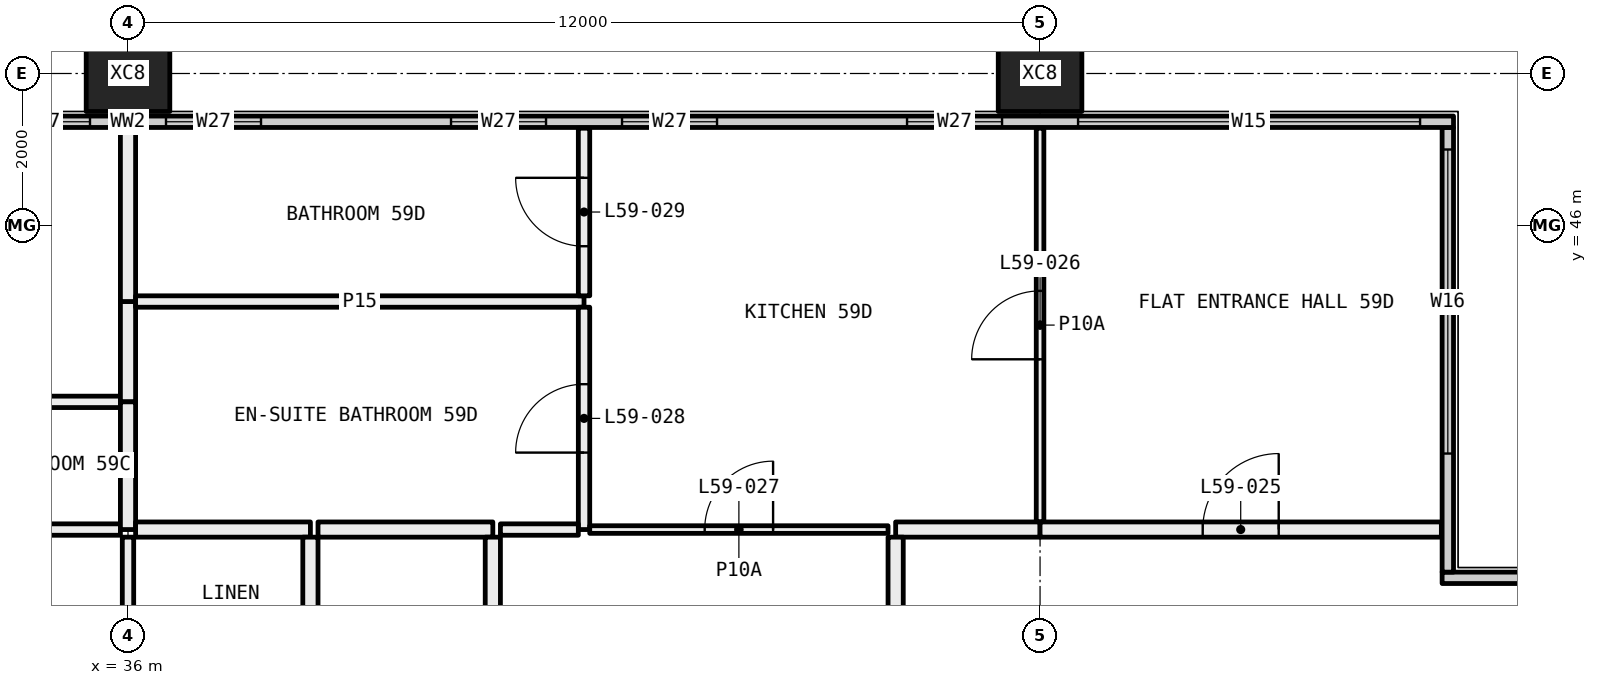
"""IFC4 building model, lengths in metres.
Left out: names, types, materials, properties, quantities, classifications, styles, units other than length and angle.
Written with IfcOpenShell. Run it as: python <this file> out.ifc"""

import sys

from ifc_helpers import new_model, si_unit, direction, frame, frame_2d, origin, origin_2d, place, context, subcontext, project, spatial, rectangle, hollow_rectangle, extrude, element, fill, save


model = new_model("IFC4")
c1 = context("Model", 3, precision=1e-05, world=origin(), true_north=direction((0.0, 1.0)))
c2 = subcontext(c1, "Body", "Model", "MODEL_VIEW")
j1 = project(units=[si_unit("LENGTHUNIT", "METRE"), si_unit("PLANEANGLEUNIT", "RADIAN")], contexts=[c1])
p1 = place(None, origin())
s1 = spatial("IfcSite", under=j1, at=p1, CompositionType="ELEMENT")
p2 = place(p1, origin())
s2 = spatial("IfcBuilding", under=s1, at=p2, CompositionType="ELEMENT")
p3 = place(p2, frame((0.0, 0.0, 221.4)))
s3 = spatial("IfcBuildingStorey", under=s2, at=p3, CompositionType="ELEMENT", Elevation=221.4)
for number, where, z_axis, x_axis in (
    (1, (36.0, 48.0, -0.4), (0.0, 0.0, 1.0), (1.0, 0.0, 0.0)),
    (2, (48.0, 48.0, -0.4), (0.0, 0.0, 1.0), (1.0, 0.0, 0.0)),
):
    element("IfcColumn", number, at=place(p3, frame(where, z_axis=z_axis, x_axis=x_axis)), inside=s3, PredefinedType="COLUMN", context=c2, shape_type="SweptSolid", body=[
        extrude(hollow_rectangle(XDim=1.1, YDim=1.0, WallThickness=0.04, at=origin_2d()), origin(), (0.0, 0.0, 1.0), 3.45),
    ])
p4 = place(p3, frame((53.29, 41.365, 0.0), z_axis=(0.0, 0.0, 1.0), x_axis=(1.0, 0.0, 0.0)))
e3 = element("IfcWall", 3, at=p4, inside=s3, PredefinedType="ELEMENTEDWALL", context=c2, shape_type="SweptSolid", body=[
    extrude(rectangle(XDim=6.15, YDim=0.15, at=frame_2d((3.075, 0.0))), origin(), (0.0, 0.0, 1.0), 3.05),
])
p5 = place(p4, frame((1.71, 0.0, 0.45)))
e4 = element("IfcOpeningElement", 4, at=p5, cuts=e3, PredefinedType="OPENING", context=c2, shape_type="SweptSolid", body=[
    extrude(rectangle(XDim=4.0, YDim=2.55, at=frame_2d((2.0, 1.275))), frame((0.0, 0.085, 0.0), z_axis=(0.0, -1.0, 0.0), x_axis=(1.0, 0.0, 0.0)), (0.0, 0.0, 1.0), 0.17),
])
p6 = place(p3, frame((53.365, 41.44, 0.0), z_axis=(0.0, 0.0, 1.0), x_axis=(0.0, 1.0, 0.0)))
e5 = element("IfcWall", 5, at=p6, inside=s3, PredefinedType="ELEMENTEDWALL", context=c2, shape_type="SweptSolid", body=[
    extrude(rectangle(XDim=5.85, YDim=0.15, at=frame_2d((2.925, 0.0))), origin(), (0.0, 0.0, 1.0), 3.05),
])
p7 = place(p6, frame((1.56, 0.0, 0.45)))
e6 = element("IfcOpeningElement", 6, at=p7, cuts=e5, PredefinedType="OPENING", context=c2, shape_type="SweptSolid", body=[
    extrude(rectangle(XDim=4.0, YDim=2.55, at=frame_2d((2.0, 1.275))), frame((0.0, 0.085, 0.0), z_axis=(0.0, -1.0, 0.0), x_axis=(1.0, 0.0, 0.0)), (0.0, 0.0, 1.0), 0.17),
])
p8 = place(p3, frame((18.56, 47.365, 0.0), z_axis=(0.0, 0.0, 1.0), x_axis=(1.0, 0.0, 0.0)))
e7 = element("IfcWall", 7, at=p8, inside=s3, PredefinedType="ELEMENTEDWALL", context=c2, shape_type="SweptSolid", body=[
    extrude(rectangle(XDim=34.88, YDim=0.15, at=frame_2d((17.44, 0.0))), origin(), (0.0, 0.0, 1.0), 3.05),
])
p9 = place(p8, frame((0.44, 0.0, 0.45)))
e8 = element("IfcOpeningElement", 8, at=p9, cuts=e7, PredefinedType="OPENING", context=c2, shape_type="SweptSolid", body=[
    extrude(rectangle(XDim=4.5, YDim=2.55, at=frame_2d((2.25, 1.275))), frame((0.0, 0.085, 0.0), z_axis=(0.0, -1.0, 0.0), x_axis=(1.0, 0.0, 0.0)), (0.0, 0.0, 1.0), 0.17),
])
p10 = place(p8, frame((5.94, 0.0, 0.45)))
e9 = element("IfcOpeningElement", 9, at=p10, cuts=e7, PredefinedType="OPENING", context=c2, shape_type="SweptSolid", body=[
    extrude(rectangle(XDim=1.25, YDim=2.55, at=frame_2d((0.625, 1.275))), frame((0.0, 0.085, 0.0), z_axis=(0.0, -1.0, 0.0), x_axis=(1.0, 0.0, 0.0)), (0.0, 0.0, 1.0), 0.17),
])
p11 = place(p8, frame((9.69, 0.0, 0.45)))
e10 = element("IfcOpeningElement", 10, at=p11, cuts=e7, PredefinedType="OPENING", context=c2, shape_type="SweptSolid", body=[
    extrude(rectangle(XDim=1.25, YDim=2.55, at=frame_2d((0.625, 1.275))), frame((0.0, 0.085, 0.0), z_axis=(0.0, -1.0, 0.0), x_axis=(1.0, 0.0, 0.0)), (0.0, 0.0, 1.0), 0.17),
])
p12 = place(p8, frame((11.94, 0.0, 0.45)))
e11 = element("IfcOpeningElement", 11, at=p12, cuts=e7, PredefinedType="OPENING", context=c2, shape_type="SweptSolid", body=[
    extrude(rectangle(XDim=1.25, YDim=2.55, at=frame_2d((0.625, 1.275))), frame((0.0, 0.085, 0.0), z_axis=(0.0, -1.0, 0.0), x_axis=(1.0, 0.0, 0.0)), (0.0, 0.0, 1.0), 0.17),
])
p13 = place(p8, frame((15.69, 0.0, 0.45)))
e12 = element("IfcOpeningElement", 12, at=p13, cuts=e7, PredefinedType="OPENING", context=c2, shape_type="SweptSolid", body=[
    extrude(rectangle(XDim=1.25, YDim=2.55, at=frame_2d((0.625, 1.275))), frame((0.0, 0.085, 0.0), z_axis=(0.0, -1.0, 0.0), x_axis=(1.0, 0.0, 0.0)), (0.0, 0.0, 1.0), 0.17),
])
p14 = place(p8, frame((17.94, 0.0, 0.45)))
e13 = element("IfcOpeningElement", 13, at=p14, cuts=e7, PredefinedType="OPENING", context=c2, shape_type="SweptSolid", body=[
    extrude(rectangle(XDim=1.25, YDim=2.55, at=frame_2d((0.625, 1.275))), frame((0.0, 0.085, 0.0), z_axis=(0.0, -1.0, 0.0), x_axis=(1.0, 0.0, 0.0)), (0.0, 0.0, 1.0), 0.17),
])
p15 = place(p8, frame((21.69, 0.0, 0.45)))
e14 = element("IfcOpeningElement", 14, at=p15, cuts=e7, PredefinedType="OPENING", context=c2, shape_type="SweptSolid", body=[
    extrude(rectangle(XDim=1.25, YDim=2.55, at=frame_2d((0.625, 1.275))), frame((0.0, 0.085, 0.0), z_axis=(0.0, -1.0, 0.0), x_axis=(1.0, 0.0, 0.0)), (0.0, 0.0, 1.0), 0.17),
])
p16 = place(p8, frame((23.94, 0.0, 0.45)))
e15 = element("IfcOpeningElement", 15, at=p16, cuts=e7, PredefinedType="OPENING", context=c2, shape_type="SweptSolid", body=[
    extrude(rectangle(XDim=1.25, YDim=2.55, at=frame_2d((0.625, 1.275))), frame((0.0, 0.085, 0.0), z_axis=(0.0, -1.0, 0.0), x_axis=(1.0, 0.0, 0.0)), (0.0, 0.0, 1.0), 0.17),
])
p17 = place(p8, frame((27.69, 0.0, 0.45)))
e16 = element("IfcOpeningElement", 16, at=p17, cuts=e7, PredefinedType="OPENING", context=c2, shape_type="SweptSolid", body=[
    extrude(rectangle(XDim=1.25, YDim=2.55, at=frame_2d((0.625, 1.275))), frame((0.0, 0.085, 0.0), z_axis=(0.0, -1.0, 0.0), x_axis=(1.0, 0.0, 0.0)), (0.0, 0.0, 1.0), 0.17),
])
p18 = place(p8, frame((29.94, 0.0, 0.45)))
e17 = element("IfcOpeningElement", 17, at=p18, cuts=e7, PredefinedType="OPENING", context=c2, shape_type="SweptSolid", body=[
    extrude(rectangle(XDim=4.5, YDim=2.55, at=frame_2d((2.25, 1.275))), frame((0.0, 0.085, 0.0), z_axis=(0.0, -1.0, 0.0), x_axis=(1.0, 0.0, 0.0)), (0.0, 0.0, 1.0), 0.17),
])
p19 = place(p3, frame((30.075, 43.68, 0.0), z_axis=(0.0, 0.0, 1.0), x_axis=(1.0, 0.0, 0.0)))
e18 = element("IfcWall", 18, at=p19, inside=s3, PredefinedType="PARTITIONING", context=c2, shape_type="SweptSolid", body=[
    extrude(rectangle(XDim=5.825, YDim=0.15, at=frame_2d((2.913, 0.0))), origin(), (0.0, 0.0, 1.0), 3.05),
])
p20 = place(p3, frame((36.0, 43.68, 0.0), z_axis=(0.0, 0.0, 1.0), x_axis=(0.0, 1.0, 0.0)))
e19 = element("IfcWall", 19, at=p20, inside=s3, PredefinedType="PARTITIONING", context=c2, shape_type="SweptSolid", body=[
    extrude(rectangle(XDim=1.32, YDim=0.2, at=frame_2d((0.66, 0.0))), origin(), (0.0, 0.0, 1.0), 2.45),
])
p21 = place(p3, frame((36.0, 45.0, 0.0), z_axis=(0.0, 0.0, 1.0), x_axis=(0.0, 1.0, 0.0)))
e20 = element("IfcWall", 20, at=p21, inside=s3, PredefinedType="PARTITIONING", context=c2, shape_type="SweptSolid", body=[
    extrude(rectangle(XDim=2.28, YDim=0.2, at=frame_2d((1.14, 0.0))), origin(), (0.0, 0.0, 1.0), 2.45),
])
p22 = place(p3, frame((30.075, 42.0, 0.0), z_axis=(0.0, 0.0, 1.0), x_axis=(1.0, 0.0, 0.0)))
e21 = element("IfcWall", 21, at=p22, inside=s3, PredefinedType="PARTITIONING", context=c2, shape_type="SweptSolid", body=[
    extrude(rectangle(XDim=5.825, YDim=0.15, at=frame_2d((2.913, 0.0))), origin(), (0.0, 0.0, 1.0), 3.05),
])
p23 = place(p22, frame((2.462, 0.0, 0.0)))
e22 = element("IfcOpeningElement", 22, at=p23, cuts=e21, PredefinedType="OPENING", context=c2, shape_type="SweptSolid", body=[
    extrude(rectangle(XDim=0.9, YDim=2.1, at=frame_2d((0.45, 1.05))), frame((0.0, 0.085, 0.0), z_axis=(0.0, -1.0, 0.0), x_axis=(1.0, 0.0, 0.0)), (0.0, 0.0, 1.0), 0.17),
])
p24 = place(p3, frame((36.0, 42.0, 0.0), z_axis=(0.0, 0.0, 1.0), x_axis=(0.0, 1.0, 0.0)))
e23 = element("IfcWall", 23, at=p24, inside=s3, PredefinedType="PARTITIONING", context=c2, shape_type="SweptSolid", body=[
    extrude(rectangle(XDim=1.68, YDim=0.2, at=frame_2d((0.84, 0.0))), origin(), (0.0, 0.0, 1.0), 2.45),
])
p25 = place(p3, frame((36.0, 38.25, 0.0), z_axis=(0.0, 0.0, 1.0), x_axis=(0.0, 1.0, 0.0)))
e24 = element("IfcWall", 24, at=p25, inside=s3, PredefinedType="PARTITIONING", context=c2, shape_type="SweptSolid", body=[
    extrude(rectangle(XDim=3.65, YDim=0.15, at=frame_2d((1.825, 0.0))), origin(), (0.0, 0.0, 1.0), 2.45),
])
p26 = place(p25, frame((1.375, 0.0, 0.0)))
e25 = element("IfcOpeningElement", 25, at=p26, cuts=e24, PredefinedType="OPENING", context=c2, shape_type="SweptSolid", body=[
    extrude(rectangle(XDim=0.9, YDim=2.1, at=frame_2d((0.45, 1.05))), frame((0.0, 0.085, 0.0), z_axis=(0.0, -1.0, 0.0), x_axis=(1.0, 0.0, 0.0)), (0.0, 0.0, 1.0), 0.17),
])
p27 = place(p3, frame((38.4, 42.0, 0.0), z_axis=(0.0, 0.0, 1.0), x_axis=(-1.0, 0.0, 0.0)))
e26 = element("IfcWall", 26, at=p27, inside=s3, PredefinedType="PARTITIONING", context=c2, shape_type="SweptSolid", body=[
    extrude(rectangle(XDim=2.3, YDim=0.2, at=frame_2d((1.15, 0.0))), origin(), (0.0, 0.0, 1.0), 3.05),
])
p28 = place(p3, frame((38.4, 38.25, 0.0), z_axis=(0.0, 0.0, 1.0), x_axis=(0.0, 1.0, 0.0)))
e27 = element("IfcWall", 27, at=p28, inside=s3, PredefinedType="PARTITIONING", context=c2, shape_type="SweptSolid", body=[
    extrude(rectangle(XDim=3.65, YDim=0.2, at=frame_2d((1.825, 0.0))), origin(), (0.0, 0.0, 1.0), 3.05),
])
p29 = place(p3, frame((42.0, 45.0, 0.0), z_axis=(0.0, 0.0, 1.0), x_axis=(-1.0, 0.0, 0.0)))
e28 = element("IfcWall", 28, at=p29, inside=s3, PredefinedType="PARTITIONING", context=c2, shape_type="SweptSolid", body=[
    extrude(rectangle(XDim=5.9, YDim=0.15, at=frame_2d((2.95, 0.0))), origin(), (0.0, 0.0, 1.0), 3.05),
])
p30 = place(p3, frame((42.0, 42.0, 0.0), z_axis=(0.0, 0.0, 1.0), x_axis=(0.0, 1.0, 0.0)))
e29 = element("IfcWall", 29, at=p30, inside=s3, PredefinedType="PARTITIONING", context=c2, shape_type="SweptSolid", body=[
    extrude(rectangle(XDim=2.925, YDim=0.15, at=frame_2d((1.462, 0.0))), origin(), (0.0, 0.0, 1.0), 3.05),
])
p31 = place(p30, frame((1.012, 0.0, 0.0)))
e30 = element("IfcOpeningElement", 30, at=p31, cuts=e29, PredefinedType="OPENING", context=c2, shape_type="SweptSolid", body=[
    extrude(rectangle(XDim=0.9, YDim=2.1, at=frame_2d((0.45, 1.05))), frame((0.0, 0.085, 0.0), z_axis=(0.0, -1.0, 0.0), x_axis=(1.0, 0.0, 0.0)), (0.0, 0.0, 1.0), 0.17),
])
p32 = place(p3, frame((40.9, 42.0, 0.0), z_axis=(0.0, 0.0, 1.0), x_axis=(1.0, 0.0, 0.0)))
e31 = element("IfcWall", 31, at=p32, inside=s3, PredefinedType="PARTITIONING", context=c2, shape_type="SweptSolid", body=[
    extrude(rectangle(XDim=1.025, YDim=0.15, at=frame_2d((0.513, 0.0))), origin(), (0.0, 0.0, 1.0), 3.05),
])
p33 = place(p3, frame((38.5, 42.0, 0.0), z_axis=(0.0, 0.0, 1.0), x_axis=(1.0, 0.0, 0.0)))
e32 = element("IfcWall", 32, at=p33, inside=s3, PredefinedType="PARTITIONING", context=c2, shape_type="SweptSolid", body=[
    extrude(rectangle(XDim=2.3, YDim=0.2, at=frame_2d((1.15, 0.0))), origin(), (0.0, 0.0, 1.0), 3.05),
])
p34 = place(p3, frame((42.0, 45.075, 0.0), z_axis=(0.0, 0.0, 1.0), x_axis=(0.0, 1.0, 0.0)))
e33 = element("IfcWall", 33, at=p34, inside=s3, PredefinedType="PARTITIONING", context=c2, shape_type="SweptSolid", body=[
    extrude(rectangle(XDim=2.205, YDim=0.15, at=frame_2d((1.103, 0.0))), origin(), (0.0, 0.0, 1.0), 3.05),
])
p35 = place(p34, frame((0.653, 0.0, 0.0)))
e34 = element("IfcOpeningElement", 34, at=p35, cuts=e33, PredefinedType="OPENING", context=c2, shape_type="SweptSolid", body=[
    extrude(rectangle(XDim=0.9, YDim=2.1, at=frame_2d((0.45, 1.05))), frame((0.0, 0.085, 0.0), z_axis=(0.0, -1.0, 0.0), x_axis=(1.0, 0.0, 0.0)), (0.0, 0.0, 1.0), 0.17),
])
p36 = place(p3, frame((48.0, 42.1, 0.0), z_axis=(0.0, 0.0, 1.0), x_axis=(0.0, 1.0, 0.0)))
e35 = element("IfcWall", 35, at=p36, inside=s3, PredefinedType="PARTITIONING", context=c2, shape_type="SweptSolid", body=[
    extrude(rectangle(XDim=5.18, YDim=0.1, at=frame_2d((2.59, 0.0))), origin(), (0.0, 0.0, 1.0), 3.05),
])
p37 = place(p36, frame((2.14, 0.0, 0.0)))
e36 = element("IfcOpeningElement", 36, at=p37, cuts=e35, PredefinedType="OPENING", context=c2, shape_type="SweptSolid", body=[
    extrude(rectangle(XDim=0.9, YDim=2.1, at=frame_2d((0.45, 1.05))), frame((0.0, 0.06, 0.0), z_axis=(0.0, -1.0, 0.0), x_axis=(1.0, 0.0, 0.0)), (0.0, 0.0, 1.0), 0.12),
])
p38 = place(p3, frame((42.075, 42.0, 0.0), z_axis=(0.0, 0.0, 1.0), x_axis=(1.0, 0.0, 0.0)))
e37 = element("IfcWall", 37, at=p38, inside=s3, PredefinedType="PARTITIONING", context=c2, shape_type="SweptSolid", body=[
    extrude(rectangle(XDim=3.925, YDim=0.1, at=frame_2d((1.962, 0.0))), origin(), (0.0, 0.0, 1.0), 3.05),
])
p39 = place(p38, frame((1.512, 0.0, 0.0)))
e38 = element("IfcOpeningElement", 38, at=p39, cuts=e37, PredefinedType="OPENING", context=c2, shape_type="SweptSolid", body=[
    extrude(rectangle(XDim=0.9, YDim=2.1, at=frame_2d((0.45, 1.05))), frame((0.0, 0.06, 0.0), z_axis=(0.0, -1.0, 0.0), x_axis=(1.0, 0.0, 0.0)), (0.0, 0.0, 1.0), 0.12),
])
p40 = place(p3, frame((46.1, 42.0, 0.0), z_axis=(0.0, 0.0, 1.0), x_axis=(1.0, 0.0, 0.0)))
e39 = element("IfcWall", 39, at=p40, inside=s3, PredefinedType="PARTITIONING", context=c2, shape_type="SweptSolid", body=[
    extrude(rectangle(XDim=1.9, YDim=0.2, at=frame_2d((0.95, 0.0))), origin(), (0.0, 0.0, 1.0), 3.05),
])
p41 = place(p3, frame((48.0, 42.0, 0.0), z_axis=(0.0, 0.0, 1.0), x_axis=(1.0, 0.0, 0.0)))
e40 = element("IfcWall", 40, at=p41, inside=s3, PredefinedType="PARTITIONING", context=c2, shape_type="SweptSolid", body=[
    extrude(rectangle(XDim=5.28, YDim=0.2, at=frame_2d((2.64, 0.0))), origin(), (0.0, 0.0, 1.0), 3.05),
])
p42 = place(p41, frame((2.14, 0.0, 0.0)))
e41 = element("IfcOpeningElement", 41, at=p42, cuts=e40, PredefinedType="OPENING", context=c2, shape_type="SweptSolid", body=[
    extrude(rectangle(XDim=1.0, YDim=2.1, at=frame_2d((0.5, 1.05))), frame((0.0, 0.11, 0.0), z_axis=(0.0, -1.0, 0.0), x_axis=(1.0, 0.0, 0.0)), (0.0, 0.0, 1.0), 0.22),
])
for number, where, z_axis, x_axis in (
    (42, (40.8, 41.9, 0.0), (0.0, 0.0, 1.0), (0.0, -1.0, 0.0)),
    (43, (46.1, 36.0, 0.0), (0.0, 0.0, 1.0), (0.0, 1.0, 0.0)),
):
    element("IfcWall", number, at=place(p3, frame(where, z_axis=z_axis, x_axis=x_axis)), inside=s3, PredefinedType="PARTITIONING", context=c2, shape_type="SweptSolid", body=[
        extrude(rectangle(XDim=5.9, YDim=0.2, at=frame_2d((2.95, 0.0))), origin(), (0.0, 0.0, 1.0), 2.45),
    ])
p43 = place(p7, origin())
e44 = element("IfcWindow", 44, at=p43, inside=s3, PartitioningType="SINGLE_PANEL", PredefinedType="WINDOW", context=c2, shape_type="SweptSolid", body=[
    extrude(rectangle(XDim=4.0, YDim=2.55, at=frame_2d((2.0, 1.275))), frame((0.0, 0.03, 0.0), z_axis=(0.0, -1.0, 0.0), x_axis=(1.0, 0.0, 0.0)), (0.0, 0.0, 1.0), 0.06),
])
fill(e6, e44)
p44 = place(p13, origin())
e45 = element("IfcWindow", 45, at=p44, inside=s3, PartitioningType="SINGLE_PANEL", PredefinedType="WINDOW", context=c2, shape_type="SweptSolid", body=[
    extrude(rectangle(XDim=1.25, YDim=2.55, at=frame_2d((0.625, 1.275))), frame((0.0, 0.03, 0.0), z_axis=(0.0, -1.0, 0.0), x_axis=(1.0, 0.0, 0.0)), (0.0, 0.0, 1.0), 0.06),
])
fill(e12, e45)
p45 = place(p14, origin())
e46 = element("IfcWindow", 46, at=p45, inside=s3, PartitioningType="SINGLE_PANEL", PredefinedType="WINDOW", context=c2, shape_type="SweptSolid", body=[
    extrude(rectangle(XDim=1.25, YDim=2.55, at=frame_2d((0.625, 1.275))), frame((0.0, 0.03, 0.0), z_axis=(0.0, -1.0, 0.0), x_axis=(1.0, 0.0, 0.0)), (0.0, 0.0, 1.0), 0.06),
])
fill(e13, e46)
p46 = place(p15, origin())
e47 = element("IfcWindow", 47, at=p46, inside=s3, PartitioningType="SINGLE_PANEL", PredefinedType="WINDOW", context=c2, shape_type="SweptSolid", body=[
    extrude(rectangle(XDim=1.25, YDim=2.55, at=frame_2d((0.625, 1.275))), frame((0.0, 0.03, 0.0), z_axis=(0.0, -1.0, 0.0), x_axis=(1.0, 0.0, 0.0)), (0.0, 0.0, 1.0), 0.06),
])
fill(e14, e47)
p47 = place(p16, origin())
e48 = element("IfcWindow", 48, at=p47, inside=s3, PartitioningType="SINGLE_PANEL", PredefinedType="WINDOW", context=c2, shape_type="SweptSolid", body=[
    extrude(rectangle(XDim=1.25, YDim=2.55, at=frame_2d((0.625, 1.275))), frame((0.0, 0.03, 0.0), z_axis=(0.0, -1.0, 0.0), x_axis=(1.0, 0.0, 0.0)), (0.0, 0.0, 1.0), 0.06),
])
fill(e15, e48)
p48 = place(p17, origin())
e49 = element("IfcWindow", 49, at=p48, inside=s3, PartitioningType="SINGLE_PANEL", PredefinedType="WINDOW", context=c2, shape_type="SweptSolid", body=[
    extrude(rectangle(XDim=1.25, YDim=2.55, at=frame_2d((0.625, 1.275))), frame((0.0, 0.03, 0.0), z_axis=(0.0, -1.0, 0.0), x_axis=(1.0, 0.0, 0.0)), (0.0, 0.0, 1.0), 0.06),
])
fill(e16, e49)
p49 = place(p18, origin())
e50 = element("IfcWindow", 50, at=p49, inside=s3, PartitioningType="SINGLE_PANEL", PredefinedType="WINDOW", context=c2, shape_type="SweptSolid", body=[
    extrude(rectangle(XDim=4.5, YDim=2.55, at=frame_2d((2.25, 1.275))), frame((0.0, 0.03, 0.0), z_axis=(0.0, -1.0, 0.0), x_axis=(1.0, 0.0, 0.0)), (0.0, 0.0, 1.0), 0.06),
])
fill(e17, e50)
p50 = place(p42, origin())
e51 = element("IfcDoor", 51, at=p50, inside=s3, OperationType="SINGLE_SWING_LEFT", PredefinedType="DOOR", context=c2, shape_type="SweptSolid", body=[
    extrude(rectangle(XDim=1.0, YDim=2.1, at=frame_2d((0.5, 1.05))), frame((0.0, 0.025, 0.0), z_axis=(0.0, -1.0, 0.0), x_axis=(1.0, 0.0, 0.0)), (0.0, 0.0, 1.0), 0.05),
])
fill(e41, e51)
p51 = place(p37, origin())
e52 = element("IfcDoor", 52, at=p51, inside=s3, OperationType="SINGLE_SWING_RIGHT", PredefinedType="DOOR", context=c2, shape_type="SweptSolid", body=[
    extrude(rectangle(XDim=0.9, YDim=2.1, at=frame_2d((0.45, 1.05))), frame((0.0, 0.025, 0.0), z_axis=(0.0, -1.0, 0.0), x_axis=(1.0, 0.0, 0.0)), (0.0, 0.0, 1.0), 0.05),
])
fill(e36, e52)
p52 = place(p39, origin())
e53 = element("IfcDoor", 53, at=p52, inside=s3, OperationType="SINGLE_SWING_LEFT", PredefinedType="DOOR", context=c2, shape_type="SweptSolid", body=[
    extrude(rectangle(XDim=0.9, YDim=2.1, at=frame_2d((0.45, 1.05))), frame((0.0, 0.025, 0.0), z_axis=(0.0, -1.0, 0.0), x_axis=(1.0, 0.0, 0.0)), (0.0, 0.0, 1.0), 0.05),
])
fill(e38, e53)
p53 = place(p31, origin())
e54 = element("IfcDoor", 54, at=p53, inside=s3, OperationType="SINGLE_SWING_RIGHT", PredefinedType="DOOR", context=c2, shape_type="SweptSolid", body=[
    extrude(rectangle(XDim=0.9, YDim=2.1, at=frame_2d((0.45, 1.05))), frame((0.0, 0.025, 0.0), z_axis=(0.0, -1.0, 0.0), x_axis=(1.0, 0.0, 0.0)), (0.0, 0.0, 1.0), 0.05),
])
fill(e30, e54)
p54 = place(p35, origin())
e55 = element("IfcDoor", 55, at=p54, inside=s3, OperationType="SINGLE_SWING_LEFT", PredefinedType="DOOR", context=c2, shape_type="SweptSolid", body=[
    extrude(rectangle(XDim=0.9, YDim=2.1, at=frame_2d((0.45, 1.05))), frame((0.0, 0.025, 0.0), z_axis=(0.0, -1.0, 0.0), x_axis=(1.0, 0.0, 0.0)), (0.0, 0.0, 1.0), 0.05),
])
fill(e34, e55)
save(model, sys.argv[1])
